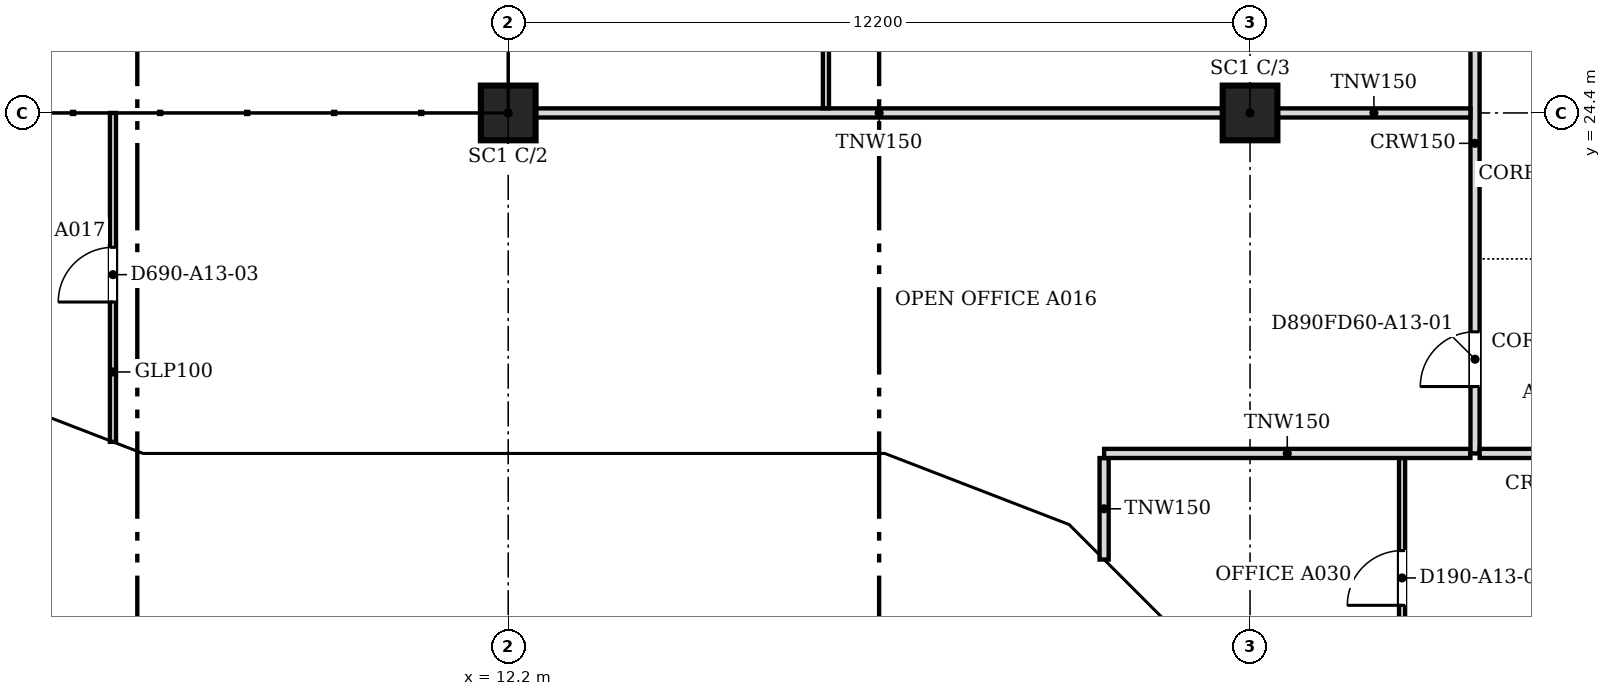
"""IFC4 building model, lengths in metres.
Left out: names, types, materials, properties, quantities, classifications, styles, units other than length and angle.
Written with IfcOpenShell. Run it as: python <this file> out.ifc"""

import sys

from ifc_helpers import new_model, si_unit, direction, frame, frame_2d, origin, origin_2d, place, context, subcontext, project, spatial, polyline, rectangle, outline, extrude, faceted_brep, source, transform, mapped, element, fill, save


model = new_model("IFC4")
c1 = context("Model", 3, precision=1e-05, world=origin(), true_north=direction((0.0, 1.0)))
c2 = subcontext(c1, "Body", "Model", "MODEL_VIEW")
j1 = project(units=[si_unit("LENGTHUNIT", "METRE"), si_unit("PLANEANGLEUNIT", "RADIAN")], contexts=[c1])
p1 = place(None, origin())
s1 = spatial("IfcSite", under=j1, at=p1, CompositionType="ELEMENT")
p2 = place(p1, origin())
s2 = spatial("IfcBuilding", under=s1, at=p2, CompositionType="ELEMENT")
p3 = place(p2, frame((0.0, 0.0, 146.8)))
s3 = spatial("IfcBuildingStorey", under=s2, at=p3, CompositionType="ELEMENT", Elevation=146.8)
for number, where, z_axis, x_axis in (
    (1, (12.2, 24.4, 0.0), (0.0, 0.0, 1.0), (1.0, 0.0, 0.0)),
    (2, (24.4, 24.4, 0.0), (0.0, 0.0, 1.0), (1.0, 0.0, 0.0)),
):
    element("IfcColumn", number, at=place(p3, frame(where, z_axis=z_axis, x_axis=x_axis)), inside=s3, PredefinedType="COLUMN", context=c2, shape_type="SweptSolid", body=[
        extrude(rectangle(XDim=0.9, YDim=0.9, at=origin_2d()), origin(), (0.0, 0.0, 1.0), 3.5),
    ])
m1 = source(origin(), c2, "Body", "Brep", [
    faceted_brep([(0.053, -0.25, 0.0), (3.003, -0.25, 3.8), (0.053, -0.25, 7.6), (0.0, -0.25, 7.532), (0.0, -0.25, 0.068), (0.106, 0.25, 7.532), (2.957, 0.25, 3.86), (2.957, 0.25, 3.74), (0.106, 0.25, 0.068), (3.003, 0.0, 3.8), (0.053, 0.0, 0.0), (0.053, 0.0, 7.6)], [[[0, 1, 2, 3, 4]], [[5, 6, 7, 8]], [[8, 7, 9, 1, 0, 10]], [[6, 5, 11, 2, 1, 9]], [[3, 2, 11]], [[10, 0, 4]], [[8, 10, 4, 3, 11, 5]], [[9, 7, 6]]]),
])
p4 = place(p3, frame((3.344, 19.631, -3.8), z_axis=(0.0, 0.0, 1.0), x_axis=(0.933007896601, -0.359855894603, 0.0)))
e3 = element("IfcWall", 3, at=p4, inside=s3, PredefinedType="SOLIDWALL", context=c2, shape_type="MappedRepresentation", body=[
    mapped(m1, transform((0.0, 0.0, 0.0), scale=1.0)),
])
m2 = source(origin(), c2, "Body", "SweptSolid", [
    extrude(outline(polyline([(0.253, 0.665), (2.687, 3.8), (0.253, 6.935), (0.253, 0.665)])), frame((0.0, 0.26, 0.0), z_axis=(0.0, -1.0, 0.0), x_axis=(1.0, 0.0, 0.0)), (0.0, 0.0, 1.0), 0.52),
])
p5 = place(p4, origin())
e4 = element("IfcOpeningElement", 4, at=p5, cuts=e3, PredefinedType="OPENING", context=c2, shape_type="MappedRepresentation", body=[
    mapped(m2, transform((0.0, 0.0, 0.0), scale=1.0)),
])
m3 = source(origin(), c2, "Body", "Brep", [
    faceted_brep([(3.003, -0.25, 0.0), (6.053, -0.25, 3.8), (3.003, -0.25, 7.6), (0.0, -0.25, 3.8), (0.047, 0.25, 3.859), (3.003, 0.25, 7.6), (6.053, 0.25, 3.8), (3.003, 0.25, 0.0), (0.047, 0.25, 3.741), (0.0, 0.0, 3.8)], [[[0, 1, 2, 3]], [[4, 5, 6, 7, 8]], [[7, 6, 1, 0]], [[6, 5, 2, 1]], [[5, 4, 9, 3, 2]], [[8, 7, 0, 3, 9]], [[8, 9, 4]]]),
])
p6 = place(p3, frame((6.146, 18.55, -3.8), z_axis=(0.0, 0.0, 1.0), x_axis=(1.0, 0.0, 0.0)))
e5 = element("IfcWall", 5, at=p6, inside=s3, PredefinedType="SOLIDWALL", context=c2, shape_type="MappedRepresentation", body=[
    mapped(m3, transform((0.0, 0.0, 0.0), scale=1.0)),
])
m4 = source(origin(), c2, "Body", "SweptSolid", [
    extrude(outline(polyline([(3.005, 0.401), (5.733, 3.8), (3.005, 7.199), (0.319, 3.8), (3.005, 0.401)])), frame((0.0, 0.26, 0.0), z_axis=(0.0, -1.0, 0.0), x_axis=(1.0, 0.0, 0.0)), (0.0, 0.0, 1.0), 0.52),
])
p7 = place(p6, origin())
e6 = element("IfcOpeningElement", 6, at=p7, cuts=e5, PredefinedType="OPENING", context=c2, shape_type="MappedRepresentation", body=[
    mapped(m4, transform((0.0, 0.0, 0.0), scale=1.0)),
])
m5 = source(origin(), c2, "Body", "Brep", [
    faceted_brep([(3.05, -0.25, 0.0), (6.1, -0.25, 3.743), (6.1, -0.25, 3.857), (3.05, -0.25, 7.6), (0.0, -0.25, 3.8), (0.0, 0.25, 3.8), (3.05, 0.25, 7.6), (6.146, 0.25, 3.8), (3.05, 0.25, 0.0), (6.146, -0.0, 3.8)], [[[0, 1, 2, 3, 4]], [[5, 6, 7, 8]], [[8, 7, 9, 1, 0]], [[7, 6, 3, 2, 9]], [[6, 5, 4, 3]], [[5, 8, 0, 4]], [[1, 9, 2]]]),
])
p8 = place(p3, frame((12.2, 18.55, -3.8), z_axis=(0.0, 0.0, 1.0), x_axis=(1.0, 0.0, 0.0)))
e7 = element("IfcWall", 7, at=p8, inside=s3, PredefinedType="SOLIDWALL", context=c2, shape_type="MappedRepresentation", body=[
    mapped(m5, transform((0.0, 0.0, 0.0), scale=1.0)),
])
m6 = source(origin(), c2, "Body", "SweptSolid", [
    extrude(outline(polyline([(3.052, 0.397), (5.824, 3.8), (3.052, 7.202), (0.321, 3.8), (3.052, 0.397)])), frame((0.0, 0.26, 0.0), z_axis=(0.0, -1.0, 0.0), x_axis=(1.0, 0.0, 0.0)), (0.0, 0.0, 1.0), 0.52),
])
p9 = place(p8, origin())
e8 = element("IfcOpeningElement", 8, at=p9, cuts=e7, PredefinedType="OPENING", context=c2, shape_type="MappedRepresentation", body=[
    mapped(m6, transform((0.0, 0.0, 0.0), scale=1.0)),
])
m7 = source(origin(), c2, "Body", "Brep", [
    faceted_brep([(3.096, -0.25, 7.536), (0.047, -0.25, 3.856), (0.047, -0.25, 3.744), (3.096, -0.25, 0.064), (0.0, 0.25, 3.8), (3.149, 0.25, 7.6), (3.202, 0.25, 7.536), (3.202, 0.25, 0.064), (3.149, 0.25, 0.0), (3.149, -0.0, 0.0), (3.149, -0.0, 7.6), (0.0, 0.0, 3.8)], [[[0, 1, 2, 3]], [[4, 5, 6, 7, 8]], [[8, 7, 9]], [[6, 5, 10]], [[5, 4, 11, 1, 0, 10]], [[4, 8, 9, 3, 2, 11]], [[11, 2, 1]], [[3, 9, 7, 6, 10, 0]]]),
])
p10 = place(p3, frame((18.346, 18.55, -3.8), z_axis=(0.0, 0.0, 1.0), x_axis=(0.932985567668, -0.359913782069, 0.0)))
e9 = element("IfcWall", 9, at=p10, inside=s3, PredefinedType="SOLIDWALL", context=c2, shape_type="MappedRepresentation", body=[
    mapped(m7, transform((0.0, 0.0, 0.0), scale=1.0)),
])
m8 = source(origin(), c2, "Body", "SweptSolid", [
    extrude(outline(polyline([(2.949, 6.967), (0.325, 3.8), (2.949, 0.633), (2.949, 6.967)])), frame((0.0, 0.26, 0.0), z_axis=(0.0, -1.0, 0.0), x_axis=(1.0, 0.0, 0.0)), (0.0, 0.0, 1.0), 0.52),
])
p11 = place(p10, origin())
e10 = element("IfcOpeningElement", 10, at=p11, cuts=e9, PredefinedType="OPENING", context=c2, shape_type="MappedRepresentation", body=[
    mapped(m8, transform((0.0, 0.0, 0.0), scale=1.0)),
])
m9 = source(origin(), c2, "Body", "Brep", [
    faceted_brep([(0.106, -0.25, 0.064), (3.156, -0.25, 3.736), (3.156, -0.25, 3.864), (0.106, -0.25, 7.536), (0.0, 0.25, 7.536), (0.053, 0.25, 7.6), (3.209, 0.25, 3.8), (0.053, 0.25, 0.0), (0.0, 0.25, 0.064), (3.209, -0.0, 3.8), (0.053, 0.0, 0.0), (0.053, 0.0, 7.6)], [[[0, 1, 2, 3]], [[4, 5, 6, 7, 8]], [[7, 6, 9, 1, 0, 10]], [[6, 5, 11, 3, 2, 9]], [[5, 4, 11]], [[8, 7, 10]], [[8, 10, 0, 3, 11, 4]], [[1, 9, 2]]]),
])
p12 = place(p3, frame((21.248, 17.454, -3.8), z_axis=(0.0, 0.0, 1.0), x_axis=(0.707106781187, -0.707106781187, 0.0)))
e11 = element("IfcWall", 11, at=p12, inside=s3, PredefinedType="SOLIDWALL", context=c2, shape_type="MappedRepresentation", body=[
    mapped(m9, transform((0.0, 0.0, 0.0), scale=1.0)),
])
m10 = source(origin(), c2, "Body", "SweptSolid", [
    extrude(outline(polyline([(0.253, 0.632), (2.884, 3.8), (0.253, 6.968), (0.253, 0.632)])), frame((0.0, 0.26, 0.0), z_axis=(0.0, -1.0, 0.0), x_axis=(1.0, 0.0, 0.0)), (0.0, 0.0, 1.0), 0.52),
])
p13 = place(p12, origin())
e12 = element("IfcOpeningElement", 12, at=p13, cuts=e11, PredefinedType="OPENING", context=c2, shape_type="MappedRepresentation", body=[
    mapped(m10, transform((0.0, 0.0, 0.0), scale=1.0)),
])
m11 = source(origin(), c2, "Body", "Brep", [
    faceted_brep([(2.95, -0.25, 0.0), (2.997, -0.25, 0.059), (2.997, -0.25, 3.8), (0.0, -0.25, 3.8), (0.053, 0.25, 3.8), (2.904, 0.25, 3.8), (2.904, 0.25, 0.06), (0.053, 0.25, 3.732), (2.95, 0.0, 0.0), (0.0, 0.0, 3.8)], [[[0, 1, 2, 3]], [[4, 5, 6, 7]], [[1, 0, 8]], [[5, 4, 9, 3, 2]], [[7, 6, 8, 0, 3, 9]], [[7, 9, 4]], [[1, 8, 6, 5, 2]]]),
])
p14 = place(p3, frame((3.394, 19.612, 0.0), z_axis=(0.0, 0.0, 1.0), x_axis=(0.932990326376, -0.359901446078, 0.0)))
e13 = element("IfcWall", 13, at=p14, inside=s3, PredefinedType="SOLIDWALL", context=c2, shape_type="MappedRepresentation", body=[
    mapped(m11, transform((0.0, 0.0, 0.0), scale=1.0)),
])
m12 = source(origin(), c2, "Body", "SweptSolid", [
    extrude(outline(polyline([(2.75, 3.55), (0.511, 3.55), (2.75, 0.665), (2.75, 3.55)])), frame((0.0, 0.26, 0.0), z_axis=(0.0, -1.0, 0.0), x_axis=(1.0, 0.0, 0.0)), (0.0, 0.0, 1.0), 0.52),
])
p15 = place(p14, origin())
e14 = element("IfcOpeningElement", 14, at=p15, cuts=e13, PredefinedType="OPENING", context=c2, shape_type="MappedRepresentation", body=[
    mapped(m12, transform((0.0, 0.0, 0.0), scale=1.0)),
])
m13 = source(origin(), c2, "Body", "Brep", [
    faceted_brep([(0.047, -0.25, 0.0), (3.05, -0.25, 3.8), (0.0, -0.25, 3.8), (0.0, -0.25, 0.06), (0.093, 0.25, 3.8), (3.05, 0.25, 3.8), (0.093, 0.25, 0.059), (0.047, 0.0, 0.0)], [[[0, 1, 2, 3]], [[4, 5, 6]], [[6, 5, 1, 0, 7]], [[5, 4, 2, 1]], [[7, 0, 3]], [[6, 7, 3, 2, 4]]]),
])
p16 = place(p3, frame((6.1, 18.55, 0.0), z_axis=(0.0, 0.0, 1.0), x_axis=(1.0, 0.0, 0.0)))
e15 = element("IfcWall", 15, at=p16, inside=s3, PredefinedType="SOLIDWALL", context=c2, shape_type="MappedRepresentation", body=[
    mapped(m13, transform((0.0, 0.0, 0.0), scale=1.0)),
])
m14 = source(origin(), c2, "Body", "SweptSolid", [
    extrude(outline(polyline([(0.247, 0.656), (2.534, 3.55), (0.247, 3.55), (0.247, 0.656)])), frame((0.0, 0.26, 0.0), z_axis=(0.0, -1.0, 0.0), x_axis=(1.0, 0.0, 0.0)), (0.0, 0.0, 1.0), 0.52),
])
p17 = place(p16, origin())
e16 = element("IfcOpeningElement", 16, at=p17, cuts=e15, PredefinedType="OPENING", context=c2, shape_type="MappedRepresentation", body=[
    mapped(m14, transform((0.0, 0.0, 0.0), scale=1.0)),
])
m15 = source(origin(), c2, "Body", "SweptSolid", [
    extrude(outline(polyline([(3.05, 0.0), (6.1, 3.8), (0.0, 3.8), (3.05, 0.0)])), frame((0.0, 0.25, 0.0), z_axis=(0.0, -1.0, 0.0), x_axis=(1.0, 0.0, 0.0)), (0.0, 0.0, 1.0), 0.5),
])
p18 = place(p3, frame((9.15, 18.55, 0.0), z_axis=(0.0, 0.0, 1.0), x_axis=(1.0, 0.0, 0.0)))
e17 = element("IfcWall", 17, at=p18, inside=s3, PredefinedType="SOLIDWALL", context=c2, shape_type="MappedRepresentation", body=[
    mapped(m15, transform((0.0, 0.0, 0.0), scale=1.0)),
])
m16 = source(origin(), c2, "Body", "SweptSolid", [
    extrude(outline(polyline([(3.05, 0.399), (5.579, 3.55), (0.521, 3.55), (3.05, 0.399)])), frame((0.0, 0.26, 0.0), z_axis=(0.0, -1.0, 0.0), x_axis=(1.0, 0.0, 0.0)), (0.0, 0.0, 1.0), 0.52),
])
p19 = place(p18, origin())
e18 = element("IfcOpeningElement", 18, at=p19, cuts=e17, PredefinedType="OPENING", context=c2, shape_type="MappedRepresentation", body=[
    mapped(m16, transform((0.0, 0.0, 0.0), scale=1.0)),
])
m17 = source(origin(), c2, "Body", "Brep", [
    faceted_brep([(3.05, -0.25, 3.8), (0.0, -0.25, 3.8), (3.05, -0.25, 0.057), (0.0, 0.25, 3.8), (3.143, 0.25, 3.8), (3.143, 0.25, 0.056), (3.096, 0.25, 0.0), (3.096, -0.0, 0.0)], [[[0, 1, 2]], [[3, 4, 5, 6]], [[6, 5, 7]], [[4, 3, 1, 0]], [[3, 6, 7, 2, 1]], [[2, 7, 5, 4, 0]]]),
])
p20 = place(p3, frame((15.25, 18.55, 0.0), z_axis=(0.0, 0.0, 1.0), x_axis=(1.0, 0.0, 0.0)))
e19 = element("IfcWall", 19, at=p20, inside=s3, PredefinedType="SOLIDWALL", context=c2, shape_type="MappedRepresentation", body=[
    mapped(m17, transform((0.0, 0.0, 0.0), scale=1.0)),
])
m18 = source(origin(), c2, "Body", "SweptSolid", [
    extrude(outline(polyline([(2.896, 3.55), (0.526, 3.55), (2.896, 0.641), (2.896, 3.55)])), frame((0.0, 0.26, 0.0), z_axis=(0.0, -1.0, 0.0), x_axis=(1.0, 0.0, 0.0)), (0.0, 0.0, 1.0), 0.52),
])
p21 = place(p20, origin())
e20 = element("IfcOpeningElement", 20, at=p21, cuts=e19, PredefinedType="OPENING", context=c2, shape_type="MappedRepresentation", body=[
    mapped(m18, transform((0.0, 0.0, 0.0), scale=1.0)),
])
m19 = source(origin(), c2, "Body", "Brep", [
    faceted_brep([(0.093, -0.25, 0.056), (3.143, -0.25, 3.736), (3.143, -0.25, 3.8), (0.093, -0.25, 3.8), (0.0, 0.25, 3.8), (3.196, 0.25, 3.8), (0.047, 0.25, 0.0), (0.0, 0.25, 0.057), (3.196, -0.0, 3.8), (0.047, 0.0, 0.0)], [[[0, 1, 2, 3]], [[4, 5, 6, 7]], [[6, 5, 8, 1, 0, 9]], [[5, 4, 3, 2, 8]], [[7, 6, 9]], [[7, 9, 0, 3, 4]], [[1, 8, 2]]]),
])
p22 = place(p3, frame((18.303, 18.567, 0.0), z_axis=(0.0, 0.0, 1.0), x_axis=(0.932978940178, -0.359930961693, 0.0)))
e21 = element("IfcWall", 21, at=p22, inside=s3, PredefinedType="SOLIDWALL", context=c2, shape_type="MappedRepresentation", body=[
    mapped(m19, transform((0.0, 0.0, 0.0), scale=1.0)),
])
m20 = source(origin(), c2, "Body", "SweptSolid", [
    extrude(outline(polyline([(0.247, 0.633), (2.664, 3.55), (0.247, 3.55), (0.247, 0.633)])), frame((0.0, 0.26, 0.0), z_axis=(0.0, -1.0, 0.0), x_axis=(1.0, 0.0, 0.0)), (0.0, 0.0, 1.0), 0.52),
])
p23 = place(p22, origin())
e22 = element("IfcOpeningElement", 22, at=p23, cuts=e21, PredefinedType="OPENING", context=c2, shape_type="MappedRepresentation", body=[
    mapped(m20, transform((0.0, 0.0, 0.0), scale=1.0)),
])
m21 = source(origin(), c2, "Body", "Brep", [
    faceted_brep([(3.103, -0.25, 3.8), (0.053, -0.25, 3.8), (0.053, -0.25, 3.736), (3.103, -0.25, 0.064), (0.0, 0.25, 3.8), (3.209, 0.25, 3.8), (3.209, 0.25, 0.064), (3.156, 0.25, 0.0), (3.156, -0.0, 0.0), (0.0, 0.0, 3.8)], [[[0, 1, 2, 3]], [[4, 5, 6, 7]], [[7, 6, 8]], [[5, 4, 9, 1, 0]], [[4, 7, 8, 3, 2, 9]], [[2, 1, 9]], [[3, 8, 6, 5, 0]]]),
])
p24 = place(p3, frame((21.285, 17.417, 0.0), z_axis=(0.0, 0.0, 1.0), x_axis=(0.707106781187, -0.707106781187, 0.0)))
e23 = element("IfcWall", 23, at=p24, inside=s3, PredefinedType="SOLIDWALL", context=c2, shape_type="MappedRepresentation", body=[
    mapped(m21, transform((0.0, 0.0, 0.0), scale=1.0)),
])
m22 = source(origin(), c2, "Body", "SweptSolid", [
    extrude(outline(polyline([(2.956, 3.55), (0.533, 3.55), (2.956, 0.632), (2.956, 3.55)])), frame((0.0, 0.26, 0.0), z_axis=(0.0, -1.0, 0.0), x_axis=(1.0, 0.0, 0.0)), (0.0, 0.0, 1.0), 0.52),
])
p25 = place(p24, origin())
e24 = element("IfcOpeningElement", 24, at=p25, cuts=e23, PredefinedType="OPENING", context=c2, shape_type="MappedRepresentation", body=[
    mapped(m22, transform((0.0, 0.0, 0.0), scale=1.0)),
])
p26 = place(p3, frame((26.9, 10.276, 0.0), z_axis=(0.0, 0.0, 1.0), x_axis=(0.0, 1.0, 0.0)))
e25 = element("IfcWall", 25, at=p26, inside=s3, PredefinedType="PARTITIONING", context=c2, shape_type="SweptSolid", body=[
    extrude(rectangle(XDim=8.448, YDim=0.1, at=frame_2d((4.224, 0.0))), origin(), (0.0, 0.0, 1.0), 2.888),
])
m23 = source(origin(), c2, "Body", "SweptSolid", [
    extrude(rectangle(XDim=0.9, YDim=2.1, at=frame_2d((0.45, 1.05))), frame((0.0, 0.06, 0.0), z_axis=(0.0, -1.0, 0.0), x_axis=(1.0, 0.0, 0.0)), (0.0, 0.0, 1.0), 0.12),
])
p27 = place(p26, frame((6.026, 0.0, 0.0)))
e26 = element("IfcOpeningElement", 26, at=p27, cuts=e25, PredefinedType="OPENING", context=c2, shape_type="MappedRepresentation", body=[
    mapped(m23, transform((0.0, 0.0, 0.0), scale=1.0)),
])
p28 = place(p26, frame((1.8, 0.0, 0.0)))
e27 = element("IfcOpeningElement", 27, at=p28, cuts=e25, PredefinedType="OPENING", context=c2, shape_type="MappedRepresentation", body=[
    mapped(m23, transform((0.0, 0.0, 0.0), scale=1.0)),
])
p29 = place(p3, frame((22.0, 17.055, 0.0), z_axis=(0.0, 0.0, 1.0), x_axis=(0.0, 1.0, 0.0)))
e28 = element("IfcWall", 28, at=p29, inside=s3, PredefinedType="PARTITIONING", context=c2, shape_type="SweptSolid", body=[
    extrude(rectangle(XDim=1.669, YDim=0.15, at=frame_2d((0.834, 0.0))), origin(), (0.0, 0.0, 1.0), 2.888),
])
p30 = place(p3, frame((22.0, 18.8, 0.0), z_axis=(0.0, 0.0, 1.0), x_axis=(1.0, 0.0, 0.0)))
e29 = element("IfcWall", 29, at=p30, inside=s3, PredefinedType="PARTITIONING", context=c2, shape_type="SweptSolid", body=[
    extrude(rectangle(XDim=6.024, YDim=0.15, at=frame_2d((3.012, 0.0))), origin(), (0.0, 0.0, 1.0), 2.888),
])
p31 = place(p3, frame((28.1, 18.8, 0.0), z_axis=(0.0, 0.0, 1.0), x_axis=(0.0, 1.0, 0.0)))
e30 = element("IfcWall", 30, at=p31, inside=s3, PredefinedType="PARTITIONING", context=c2, shape_type="SweptSolid", body=[
    extrude(rectangle(XDim=26.024, YDim=0.15, at=frame_2d((13.012, 0.0))), origin(), (0.0, 0.0, 1.0), 2.888),
])
m24 = source(origin(), c2, "Body", "SweptSolid", [
    extrude(rectangle(XDim=0.9, YDim=2.1, at=frame_2d((0.45, 1.05))), frame((0.0, 0.085, 0.0), z_axis=(0.0, -1.0, 0.0), x_axis=(1.0, 0.0, 0.0)), (0.0, 0.0, 1.0), 0.17),
])
p32 = place(p31, frame((1.1, 0.0, 0.0)))
e31 = element("IfcOpeningElement", 31, at=p32, cuts=e30, PredefinedType="OPENING", context=c2, shape_type="MappedRepresentation", body=[
    mapped(m24, transform((0.0, 0.0, 0.0), scale=1.0)),
])
m25 = source(origin(), c2, "Body", "SweptSolid", [
    extrude(rectangle(XDim=1.0, YDim=2.1, at=frame_2d((0.5, 1.05))), frame((0.0, 0.085, 0.0), z_axis=(0.0, -1.0, 0.0), x_axis=(1.0, 0.0, 0.0)), (0.0, 0.0, 1.0), 0.17),
])
p33 = place(p31, frame((14.201, 0.0, 0.0)))
e32 = element("IfcOpeningElement", 32, at=p33, cuts=e30, PredefinedType="OPENING", context=c2, shape_type="MappedRepresentation", body=[
    mapped(m25, transform((0.0, 0.0, 0.0), scale=1.0)),
])
p34 = place(p31, frame((8.2, 0.0, 0.0)))
e33 = element("IfcOpeningElement", 33, at=p34, cuts=e30, PredefinedType="OPENING", context=c2, shape_type="MappedRepresentation", body=[
    mapped(m24, transform((0.0, 0.0, 0.0), scale=1.0)),
])
p35 = place(p31, frame((21.4, 0.0, 0.0)))
e34 = element("IfcOpeningElement", 34, at=p35, cuts=e30, PredefinedType="OPENING", context=c2, shape_type="MappedRepresentation", body=[
    mapped(m25, transform((0.0, 0.0, 0.0), scale=1.0)),
])
p36 = place(p3, frame((28.176, 18.8, 0.0), z_axis=(0.0, 0.0, 1.0), x_axis=(1.0, 0.0, 0.0)))
e35 = element("IfcWall", 35, at=p36, inside=s3, PredefinedType="PARTITIONING", context=c2, shape_type="SweptSolid", body=[
    extrude(rectangle(XDim=2.248, YDim=0.15, at=frame_2d((1.124, 0.0))), origin(), (0.0, 0.0, 1.0), 2.888),
])
p37 = place(p3, frame((5.7, 18.99, 0.0), z_axis=(0.0, 0.0, 1.0), x_axis=(0.0, 1.0, 0.0)))
e36 = element("IfcWall", 36, at=p37, inside=s3, PredefinedType="PARTITIONING", context=c2, shape_type="SweptSolid", body=[
    extrude(rectangle(XDim=5.41, YDim=0.1, at=frame_2d((2.705, 0.0))), origin(), (0.0, 0.0, 1.0), 2.888),
])
p38 = place(p37, frame((2.3, 0.0, 0.0)))
e37 = element("IfcOpeningElement", 37, at=p38, cuts=e36, PredefinedType="OPENING", context=c2, shape_type="MappedRepresentation", body=[
    mapped(m23, transform((0.0, 0.0, 0.0), scale=1.0)),
])
p39 = place(p3, frame((12.651, 24.4, 0.0), z_axis=(0.0, 0.0, 1.0), x_axis=(1.0, 0.0, 0.0)))
e38 = element("IfcWall", 38, at=p39, inside=s3, PredefinedType="PARTITIONING", context=c2, shape_type="SweptSolid", body=[
    extrude(rectangle(XDim=11.298, YDim=0.15, at=frame_2d((5.649, 0.0))), origin(), (0.0, 0.0, 1.0), 2.888),
])
p40 = place(p3, frame((24.851, 24.4, 0.0), z_axis=(0.0, 0.0, 1.0), x_axis=(1.0, 0.0, 0.0)))
e39 = element("IfcWall", 39, at=p40, inside=s3, PredefinedType="PARTITIONING", context=c2, shape_type="SweptSolid", body=[
    extrude(rectangle(XDim=3.173, YDim=0.15, at=frame_2d((1.586, 0.0))), origin(), (0.0, 0.0, 1.0), 2.888),
])
p41 = place(p3, frame((17.425, 24.476, 0.0), z_axis=(0.0, 0.0, 1.0), x_axis=(0.0, 1.0, 0.0)))
e40 = element("IfcWall", 40, at=p41, inside=s3, PredefinedType="PARTITIONING", context=c2, shape_type="SweptSolid", body=[
    extrude(rectangle(XDim=5.948, YDim=0.1, at=frame_2d((2.974, 0.0))), origin(), (0.0, 0.0, 1.0), 2.888),
])
p42 = place(p41, frame((2.5, 0.0, 0.0)))
e41 = element("IfcOpeningElement", 41, at=p42, cuts=e40, PredefinedType="OPENING", context=c2, shape_type="MappedRepresentation", body=[
    mapped(m23, transform((0.0, 0.0, 0.0), scale=1.0)),
])
m26 = source(origin(), c2, "Body", "SweptSolid", [
    extrude(rectangle(XDim=0.9, YDim=2.1, at=frame_2d((0.45, 1.05))), frame((0.0, 0.025, 0.0), z_axis=(0.0, -1.0, 0.0), x_axis=(1.0, 0.0, 0.0)), (0.0, 0.0, 1.0), 0.05),
])
p43 = place(p32, origin())
e42 = element("IfcDoor", 42, at=p43, inside=s3, OperationType="SINGLE_SWING_LEFT", PredefinedType="DOOR", context=c2, shape_type="MappedRepresentation", body=[
    mapped(m26, transform((0.0, 0.0, 0.0), scale=1.0)),
])
fill(e31, e42)
p44 = place(p27, origin())
e43 = element("IfcDoor", 43, at=p44, inside=s3, OperationType="SINGLE_SWING_LEFT", PredefinedType="DOOR", context=c2, shape_type="MappedRepresentation", body=[
    mapped(m26, transform((0.0, 0.0, 0.0), scale=1.0)),
])
fill(e26, e43)
p45 = place(p38, origin())
e44 = element("IfcDoor", 44, at=p45, inside=s3, OperationType="SINGLE_SWING_LEFT", PredefinedType="DOOR", context=c2, shape_type="MappedRepresentation", body=[
    mapped(m26, transform((0.0, 0.0, 0.0), scale=1.0)),
])
fill(e37, e44)
save(model, sys.argv[1])
